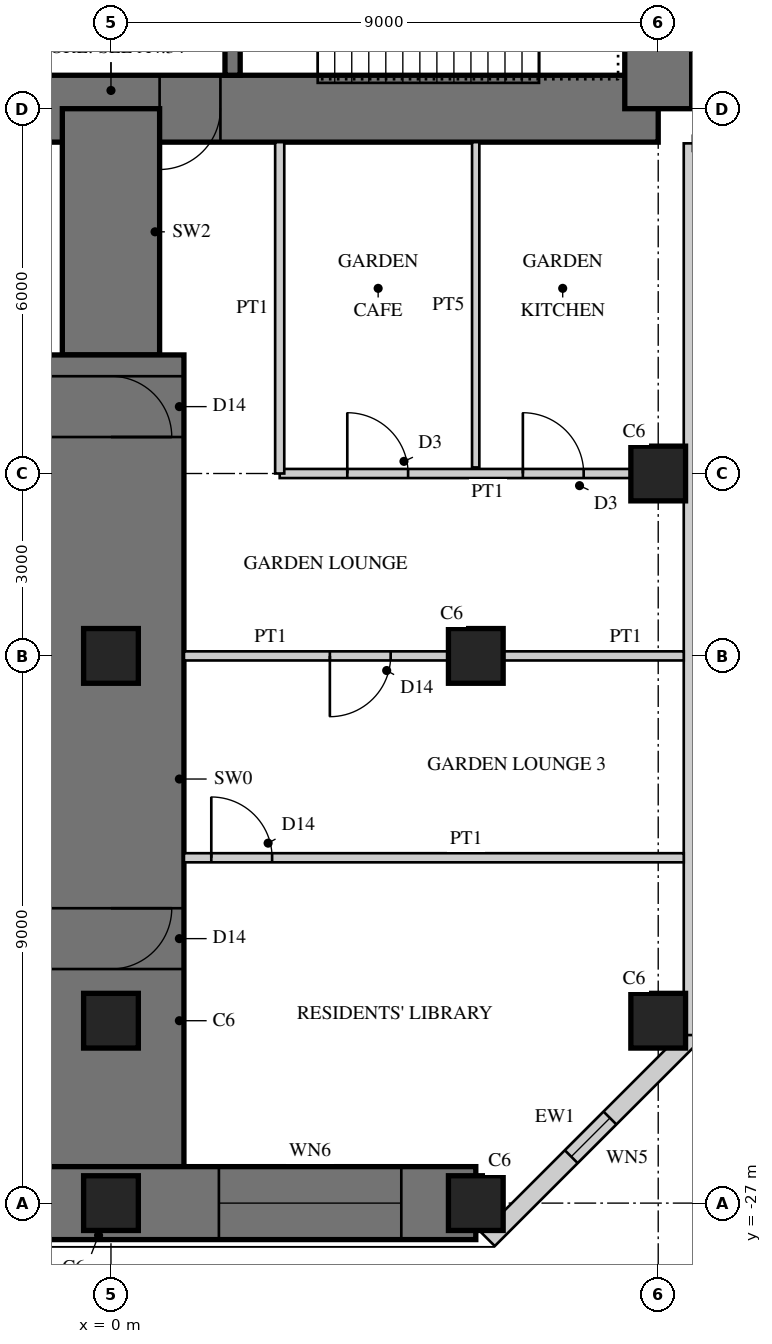
"""IFC4 building model, lengths in metres.
Left out: names, types, materials, properties, quantities, classifications, styles, units other than length and angle.
Written with IfcOpenShell. Run it as: python <this file> out.ifc"""

import sys

from ifc_helpers import new_model, si_unit, direction, frame, frame_2d, origin, origin_2d, place, context, subcontext, project, spatial, rectangle, hollow_rectangle, extrude, element, fill, save


model = new_model("IFC4")
c1 = context("Model", 3, precision=1e-05, world=origin(), true_north=direction((0.0, 1.0)))
c2 = subcontext(c1, "Body", "Model", "MODEL_VIEW")
j1 = project(units=[si_unit("LENGTHUNIT", "METRE"), si_unit("PLANEANGLEUNIT", "RADIAN")], contexts=[c1])
p1 = place(None, origin())
s1 = spatial("IfcSite", under=j1, at=p1, CompositionType="ELEMENT")
p2 = place(p1, origin())
s2 = spatial("IfcBuilding", under=s1, at=p2, CompositionType="ELEMENT")
p3 = place(p2, frame((0.0, 0.0, 217.1)))
s3 = spatial("IfcBuildingStorey", under=s2, at=p3, CompositionType="ELEMENT", Elevation=217.1)
p4 = place(p3, frame((-9.0, -9.0, 0.0), z_axis=(0.0, 0.0, 1.0), x_axis=(1.0, 0.0, 0.0)))
e1 = element("IfcWall", 1, at=p4, inside=s3, PredefinedType="SHEAR", context=c2, shape_type="SweptSolid", body=[
    extrude(rectangle(XDim=18.0, YDim=1.1, at=frame_2d((9.0, 0.0))), origin(), (0.0, 0.0, 1.0), 5.0),
])
p5 = place(p4, frame((9.8, 0.0, 0.0)))
e2 = element("IfcOpeningElement", 2, at=p5, cuts=e1, PredefinedType="OPENING", context=c2, shape_type="SweptSolid", body=[
    extrude(rectangle(XDim=1.0, YDim=2.4, at=frame_2d((0.5, 1.2))), frame((0.0, 0.56, 0.0), z_axis=(0.0, -1.0, 0.0), x_axis=(1.0, 0.0, 0.0)), (0.0, 0.0, 1.0), 1.12),
])
p6 = place(p3, frame((9.0, -9.0, 0.0), z_axis=(0.0, 0.0, 1.0), x_axis=(0.0, 1.0, 0.0)))
e3 = element("IfcWall", 3, at=p6, inside=s3, PredefinedType="SHEAR", context=c2, shape_type="SweptSolid", body=[
    extrude(rectangle(XDim=18.0, YDim=1.1, at=frame_2d((9.0, 0.0))), origin(), (0.0, 0.0, 1.0), 5.0),
])
p7 = place(p6, frame((9.8, 0.0, 0.0)))
e4 = element("IfcOpeningElement", 4, at=p7, cuts=e3, PredefinedType="OPENING", context=c2, shape_type="SweptSolid", body=[
    extrude(rectangle(XDim=1.0, YDim=2.4, at=frame_2d((0.5, 1.2))), frame((0.0, 0.56, 0.0), z_axis=(0.0, -1.0, 0.0), x_axis=(1.0, 0.0, 0.0)), (0.0, 0.0, 1.0), 1.12),
])
p8 = place(p3, frame((2.0, -1.675, 0.0), z_axis=(0.0, 0.0, 1.0), x_axis=(0.0, -1.0, 0.0)))
e5 = element("IfcWall", 5, at=p8, inside=s3, PredefinedType="SHEAR", context=c2, shape_type="SweptSolid", body=[
    extrude(rectangle(XDim=6.775, YDim=0.25, at=frame_2d((3.387, 0.0))), origin(), (0.0, 0.0, 1.0), 5.0),
])
p9 = place(p8, frame((0.725, 0.0, 0.0)))
e6 = element("IfcOpeningElement", 6, at=p9, cuts=e5, PredefinedType="OPENING", context=c2, shape_type="SweptSolid", body=[
    extrude(rectangle(XDim=1.0, YDim=2.1, at=frame_2d((0.5, 1.05))), frame((0.0, 0.135, 0.0), z_axis=(0.0, -1.0, 0.0), x_axis=(1.0, 0.0, 0.0)), (0.0, 0.0, 1.0), 0.27),
])
p10 = place(p3, frame((0.0, -9.0, 0.0), z_axis=(0.0, 0.0, 1.0), x_axis=(0.0, -1.0, 0.0)))
e7 = element("IfcWall", 7, at=p10, inside=s3, PredefinedType="SHEAR", context=c2, shape_type="SweptSolid", body=[
    extrude(rectangle(XDim=4.05, YDim=1.6, at=frame_2d((2.025, 0.0))), origin(), (0.0, 0.0, 1.0), 5.0),
])
p11 = place(p3, frame((0.0, -13.05, 0.0), z_axis=(0.0, 0.0, 1.0), x_axis=(0.0, -1.0, 0.0)))
e8 = element("IfcWall", 8, at=p11, inside=s3, PredefinedType="SHEAR", context=c2, shape_type="SweptSolid", body=[
    extrude(rectangle(XDim=13.95, YDim=2.4, at=frame_2d((6.975, 0.0))), origin(), (0.0, 0.0, 1.0), 5.0),
])
p12 = place(p11, frame((0.35, 0.0, 0.0)))
e9 = element("IfcOpeningElement", 9, at=p12, cuts=e8, PredefinedType="OPENING", context=c2, shape_type="SweptSolid", body=[
    extrude(rectangle(XDim=1.0, YDim=2.2, at=frame_2d((0.5, 1.1))), frame((0.0, 1.21, 0.0), z_axis=(0.0, -1.0, 0.0), x_axis=(1.0, 0.0, 0.0)), (0.0, 0.0, 1.0), 2.42),
])
p13 = place(p11, frame((9.1, 0.0, 0.0)))
e10 = element("IfcOpeningElement", 10, at=p13, cuts=e8, PredefinedType="OPENING", context=c2, shape_type="SweptSolid", body=[
    extrude(rectangle(XDim=1.0, YDim=2.2, at=frame_2d((0.5, 1.1))), frame((0.0, 1.21, 0.0), z_axis=(0.0, -1.0, 0.0), x_axis=(1.0, 0.0, 0.0)), (0.0, 0.0, 1.0), 2.42),
])
p14 = place(p3, frame((-6.0, -27.0, 0.0), z_axis=(0.0, 0.0, 1.0), x_axis=(1.0, 0.0, 0.0)))
e11 = element("IfcWall", 11, at=p14, inside=s3, PredefinedType="SHEAR", context=c2, shape_type="SweptSolid", body=[
    extrude(rectangle(XDim=12.0, YDim=1.2, at=frame_2d((6.0, 0.0))), origin(), (0.0, 0.0, 1.0), 5.0),
])
p15 = place(p14, frame((1.225, 0.0, 0.6)))
e12 = element("IfcOpeningElement", 12, at=p15, cuts=e11, PredefinedType="OPENING", context=c2, shape_type="SweptSolid", body=[
    extrude(rectangle(XDim=3.0, YDim=2.4, at=frame_2d((1.5, 1.2))), frame((0.0, 0.61, 0.0), z_axis=(0.0, -1.0, 0.0), x_axis=(1.0, 0.0, 0.0)), (0.0, 0.0, 1.0), 1.22),
])
p16 = place(p14, frame((7.775, 0.0, 0.6)))
e13 = element("IfcOpeningElement", 13, at=p16, cuts=e11, PredefinedType="OPENING", context=c2, shape_type="SweptSolid", body=[
    extrude(rectangle(XDim=3.0, YDim=2.4, at=frame_2d((1.5, 1.2))), frame((0.0, 0.61, 0.0), z_axis=(0.0, -1.0, 0.0), x_axis=(1.0, 0.0, 0.0)), (0.0, 0.0, 1.0), 1.22),
])
for number, where, z_axis, x_axis in (
    (14, (9.0, -15.0, 0.0), (0.0, 0.0, 1.0), (1.0, 0.0, 0.0)),
    (15, (9.0, -24.0, 0.0), (0.0, 0.0, 1.0), (1.0, 0.0, 0.0)),
    (16, (0.0, -27.0, 0.0), (0.0, 0.0, 1.0), (1.0, 0.0, 0.0)),
    (17, (6.0, -27.0, 0.0), (0.0, 0.0, 1.0), (1.0, 0.0, 0.0)),
    (18, (0.0, -18.0, 0.0), (0.0, 0.0, 1.0), (1.0, 0.0, 0.0)),
    (19, (6.0, -18.0, 0.0), (0.0, 0.0, 1.0), (1.0, 0.0, 0.0)),
    (20, (0.0, -24.0, 0.0), (0.0, 0.0, 1.0), (1.0, 0.0, 0.0)),
):
    element("IfcColumn", number, at=place(p3, frame(where, z_axis=z_axis, x_axis=x_axis)), inside=s3, PredefinedType="COLUMN", context=c2, shape_type="SweptSolid", body=[
        extrude(rectangle(XDim=0.9, YDim=0.9, at=origin_2d()), origin(), (0.0, 0.0, 1.0), 5.0),
    ])
p17 = place(p3, frame((6.206, -27.6, 0.0), z_axis=(0.0, 0.0, 1.0), x_axis=(0.707106781187, 0.707106781187, 0.0)))
e21 = element("IfcWall", 21, at=p17, inside=s3, PredefinedType="SOLIDWALL", context=c2, shape_type="SweptSolid", body=[
    extrude(rectangle(XDim=4.757, YDim=0.3, at=frame_2d((2.379, 0.0))), origin(), (0.0, 0.0, 1.0), 4.82),
])
p18 = place(p17, frame((1.929, 0.0, 0.3)))
e22 = element("IfcOpeningElement", 22, at=p18, cuts=e21, PredefinedType="OPENING", context=c2, shape_type="SweptSolid", body=[
    extrude(rectangle(XDim=0.9, YDim=2.4, at=frame_2d((0.45, 1.2))), frame((0.0, 0.16, 0.0), z_axis=(0.0, -1.0, 0.0), x_axis=(1.0, 0.0, 0.0)), (0.0, 0.0, 1.0), 0.32),
])
p19 = place(p3, frame((9.57, -24.236, 0.0), z_axis=(0.0, 0.0, 1.0), x_axis=(0.0, 1.0, 0.0)))
e23 = element("IfcWall", 23, at=p19, inside=s3, PredefinedType="SOLIDWALL", context=c2, shape_type="SweptSolid", body=[
    extrude(rectangle(XDim=14.666, YDim=0.3, at=frame_2d((7.333, 0.0))), origin(), (0.0, 0.0, 1.0), 4.82),
])
p20 = place(p3, frame((2.775, -15.0, 0.0), z_axis=(0.0, 0.0, 1.0), x_axis=(1.0, 0.0, 0.0)))
e24 = element("IfcWall", 24, at=p20, inside=s3, PredefinedType="PARTITIONING", context=c2, shape_type="SweptSolid", body=[
    extrude(rectangle(XDim=5.775, YDim=0.15, at=frame_2d((2.888, 0.0))), origin(), (0.0, 0.0, 1.0), 4.07),
])
p21 = place(p20, frame((1.112, 0.0, 0.0)))
e25 = element("IfcOpeningElement", 25, at=p21, cuts=e24, PredefinedType="OPENING", context=c2, shape_type="SweptSolid", body=[
    extrude(rectangle(XDim=1.0, YDim=2.1, at=frame_2d((0.5, 1.05))), frame((0.0, 0.085, 0.0), z_axis=(0.0, -1.0, 0.0), x_axis=(1.0, 0.0, 0.0)), (0.0, 0.0, 1.0), 0.17),
])
p22 = place(p20, frame((3.999, 0.0, 0.0)))
e26 = element("IfcOpeningElement", 26, at=p22, cuts=e24, PredefinedType="OPENING", context=c2, shape_type="SweptSolid", body=[
    extrude(rectangle(XDim=1.0, YDim=2.1, at=frame_2d((0.5, 1.05))), frame((0.0, 0.085, 0.0), z_axis=(0.0, -1.0, 0.0), x_axis=(1.0, 0.0, 0.0)), (0.0, 0.0, 1.0), 0.17),
])
p23 = place(p3, frame((2.775, -9.55, 0.0), z_axis=(0.0, 0.0, 1.0), x_axis=(0.0, -1.0, 0.0)))
e27 = element("IfcWall", 27, at=p23, inside=s3, PredefinedType="PARTITIONING", context=c2, shape_type="SweptSolid", body=[
    extrude(rectangle(XDim=5.45, YDim=0.15, at=frame_2d((2.725, 0.0))), origin(), (0.0, 0.0, 1.0), 4.82),
])
p24 = place(p3, frame((5.998, -9.55, 0.0), z_axis=(0.0, 0.0, 1.0), x_axis=(0.0, -1.0, 0.0)))
e28 = element("IfcWall", 28, at=p24, inside=s3, PredefinedType="PLUMBINGWALL", context=c2, shape_type="SweptSolid", body=[
    extrude(rectangle(XDim=5.35, YDim=0.12, at=frame_2d((2.675, 0.0))), origin(), (0.0, 0.0, 1.0), 3.92),
])
p25 = place(p3, frame((1.2, -21.32, 0.0), z_axis=(0.0, 0.0, 1.0), x_axis=(1.0, 0.0, 0.0)))
e29 = element("IfcWall", 29, at=p25, inside=s3, PredefinedType="PARTITIONING", context=c2, shape_type="SweptSolid", body=[
    extrude(rectangle(XDim=8.22, YDim=0.15, at=frame_2d((4.11, 0.0))), origin(), (0.0, 0.0, 1.0), 4.82),
])
p26 = place(p25, frame((0.45, 0.0, 0.0)))
e30 = element("IfcOpeningElement", 30, at=p26, cuts=e29, PredefinedType="OPENING", context=c2, shape_type="SweptSolid", body=[
    extrude(rectangle(XDim=1.0, YDim=2.2, at=frame_2d((0.5, 1.1))), frame((0.0, 0.085, 0.0), z_axis=(0.0, -1.0, 0.0), x_axis=(1.0, 0.0, 0.0)), (0.0, 0.0, 1.0), 0.17),
])
p27 = place(p3, frame((1.2, -18.0, 0.0), z_axis=(0.0, 0.0, 1.0), x_axis=(1.0, 0.0, 0.0)))
e31 = element("IfcWall", 31, at=p27, inside=s3, PredefinedType="PARTITIONING", context=c2, shape_type="SweptSolid", body=[
    extrude(rectangle(XDim=4.35, YDim=0.15, at=frame_2d((2.175, 0.0))), origin(), (0.0, 0.0, 1.0), 4.82),
])
p28 = place(p27, frame((2.4, 0.0, 0.0)))
e32 = element("IfcOpeningElement", 32, at=p28, cuts=e31, PredefinedType="OPENING", context=c2, shape_type="SweptSolid", body=[
    extrude(rectangle(XDim=1.0, YDim=2.2, at=frame_2d((0.5, 1.1))), frame((0.0, 0.085, 0.0), z_axis=(0.0, -1.0, 0.0), x_axis=(1.0, 0.0, 0.0)), (0.0, 0.0, 1.0), 0.17),
])
p29 = place(p3, frame((6.45, -18.0, 0.0), z_axis=(0.0, 0.0, 1.0), x_axis=(1.0, 0.0, 0.0)))
e33 = element("IfcWall", 33, at=p29, inside=s3, PredefinedType="PARTITIONING", context=c2, shape_type="SweptSolid", body=[
    extrude(rectangle(XDim=2.97, YDim=0.15, at=frame_2d((1.485, 0.0))), origin(), (0.0, 0.0, 1.0), 4.82),
])
p30 = place(p16, origin())
e34 = element("IfcWindow", 34, at=p30, inside=s3, PartitioningType="SINGLE_PANEL", PredefinedType="WINDOW", context=c2, shape_type="SweptSolid", body=[
    extrude(hollow_rectangle(XDim=3.0, YDim=2.4, WallThickness=0.06, at=frame_2d((1.5, 1.2))), frame((0.0, 0.03, 0.0), z_axis=(0.0, -1.0, 0.0), x_axis=(1.0, 0.0, 0.0)), (0.0, 0.0, 1.0), 0.06),
    extrude(rectangle(XDim=2.879, YDim=2.279, at=frame_2d((1.5, 1.2))), frame((0.0, 0.03, 0.0), z_axis=(0.0, -1.0, 0.0), x_axis=(1.0, 0.0, 0.0)), (0.0, 0.0, 1.0), 0.06),
])
fill(e13, e34)
p31 = place(p18, origin())
e35 = element("IfcWindow", 35, at=p31, inside=s3, PartitioningType="SINGLE_PANEL", PredefinedType="WINDOW", context=c2, shape_type="SweptSolid", body=[
    extrude(hollow_rectangle(XDim=0.9, YDim=2.4, WallThickness=0.06, at=frame_2d((0.45, 1.2))), frame((0.0, 0.03, 0.0), z_axis=(0.0, -1.0, 0.0), x_axis=(1.0, 0.0, 0.0)), (0.0, 0.0, 1.0), 0.06),
    extrude(rectangle(XDim=0.779, YDim=2.279, at=frame_2d((0.45, 1.2))), frame((0.0, 0.03, 0.0), z_axis=(0.0, -1.0, 0.0), x_axis=(1.0, 0.0, 0.0)), (0.0, 0.0, 1.0), 0.06),
])
fill(e22, e35)
p32 = place(p21, origin())
e36 = element("IfcDoor", 36, at=p32, inside=s3, OperationType="SINGLE_SWING_LEFT", PredefinedType="DOOR", context=c2, shape_type="SweptSolid", body=[
    extrude(rectangle(XDim=1.0, YDim=2.1, at=frame_2d((0.5, 1.05))), frame((0.0, 0.025, 0.0), z_axis=(0.0, -1.0, 0.0), x_axis=(1.0, 0.0, 0.0)), (0.0, 0.0, 1.0), 0.05),
])
fill(e25, e36)
p33 = place(p22, origin())
e37 = element("IfcDoor", 37, at=p33, inside=s3, OperationType="SINGLE_SWING_LEFT", PredefinedType="DOOR", context=c2, shape_type="SweptSolid", body=[
    extrude(rectangle(XDim=1.0, YDim=2.1, at=frame_2d((0.5, 1.05))), frame((0.0, 0.025, 0.0), z_axis=(0.0, -1.0, 0.0), x_axis=(1.0, 0.0, 0.0)), (0.0, 0.0, 1.0), 0.05),
])
fill(e26, e37)
p34 = place(p26, origin())
e38 = element("IfcDoor", 38, at=p34, inside=s3, OperationType="SINGLE_SWING_LEFT", PredefinedType="DOOR", context=c2, shape_type="SweptSolid", body=[
    extrude(rectangle(XDim=1.0, YDim=2.2, at=frame_2d((0.5, 1.1))), frame((0.0, 0.025, 0.0), z_axis=(0.0, -1.0, 0.0), x_axis=(1.0, 0.0, 0.0)), (0.0, 0.0, 1.0), 0.05),
])
fill(e30, e38)
p35 = place(p28, frame((1.0, 0.0, 0.0), z_axis=(0.0, 0.0, 1.0), x_axis=(-1.0, 0.0, 0.0)))
e39 = element("IfcDoor", 39, at=p35, inside=s3, OperationType="SINGLE_SWING_RIGHT", PredefinedType="DOOR", context=c2, shape_type="SweptSolid", body=[
    extrude(rectangle(XDim=1.0, YDim=2.2, at=frame_2d((0.5, 1.1))), frame((0.0, 0.025, 0.0), z_axis=(0.0, -1.0, 0.0), x_axis=(1.0, 0.0, 0.0)), (0.0, 0.0, 1.0), 0.05),
])
fill(e32, e39)
p36 = place(p12, origin())
e40 = element("IfcDoor", 40, at=p36, inside=s3, OperationType="SINGLE_SWING_RIGHT", PredefinedType="DOOR", context=c2, shape_type="SweptSolid", body=[
    extrude(rectangle(XDim=1.0, YDim=2.2, at=frame_2d((0.5, 1.1))), frame((0.0, 0.025, 0.0), z_axis=(0.0, -1.0, 0.0), x_axis=(1.0, 0.0, 0.0)), (0.0, 0.0, 1.0), 0.05),
])
fill(e9, e40)
p37 = place(p13, origin())
e41 = element("IfcDoor", 41, at=p37, inside=s3, OperationType="SINGLE_SWING_LEFT", PredefinedType="DOOR", context=c2, shape_type="SweptSolid", body=[
    extrude(rectangle(XDim=1.0, YDim=2.2, at=frame_2d((0.5, 1.1))), frame((0.0, 0.025, 0.0), z_axis=(0.0, -1.0, 0.0), x_axis=(1.0, 0.0, 0.0)), (0.0, 0.0, 1.0), 0.05),
])
fill(e10, e41)
p38 = place(p5, frame((1.0, 0.0, 0.0), z_axis=(0.0, 0.0, 1.0), x_axis=(-1.0, 0.0, 0.0)))
e42 = element("IfcDoor", 42, at=p38, inside=s3, OperationType="SINGLE_SWING_RIGHT", PredefinedType="DOOR", context=c2, shape_type="SweptSolid", body=[
    extrude(rectangle(XDim=1.0, YDim=2.4, at=frame_2d((0.5, 1.2))), frame((0.0, -0.005, 0.0), z_axis=(0.0, -1.0, 0.0), x_axis=(1.0, 0.0, 0.0)), (0.0, 0.0, 1.0), 0.05),
])
fill(e2, e42)
save(model, sys.argv[1])
